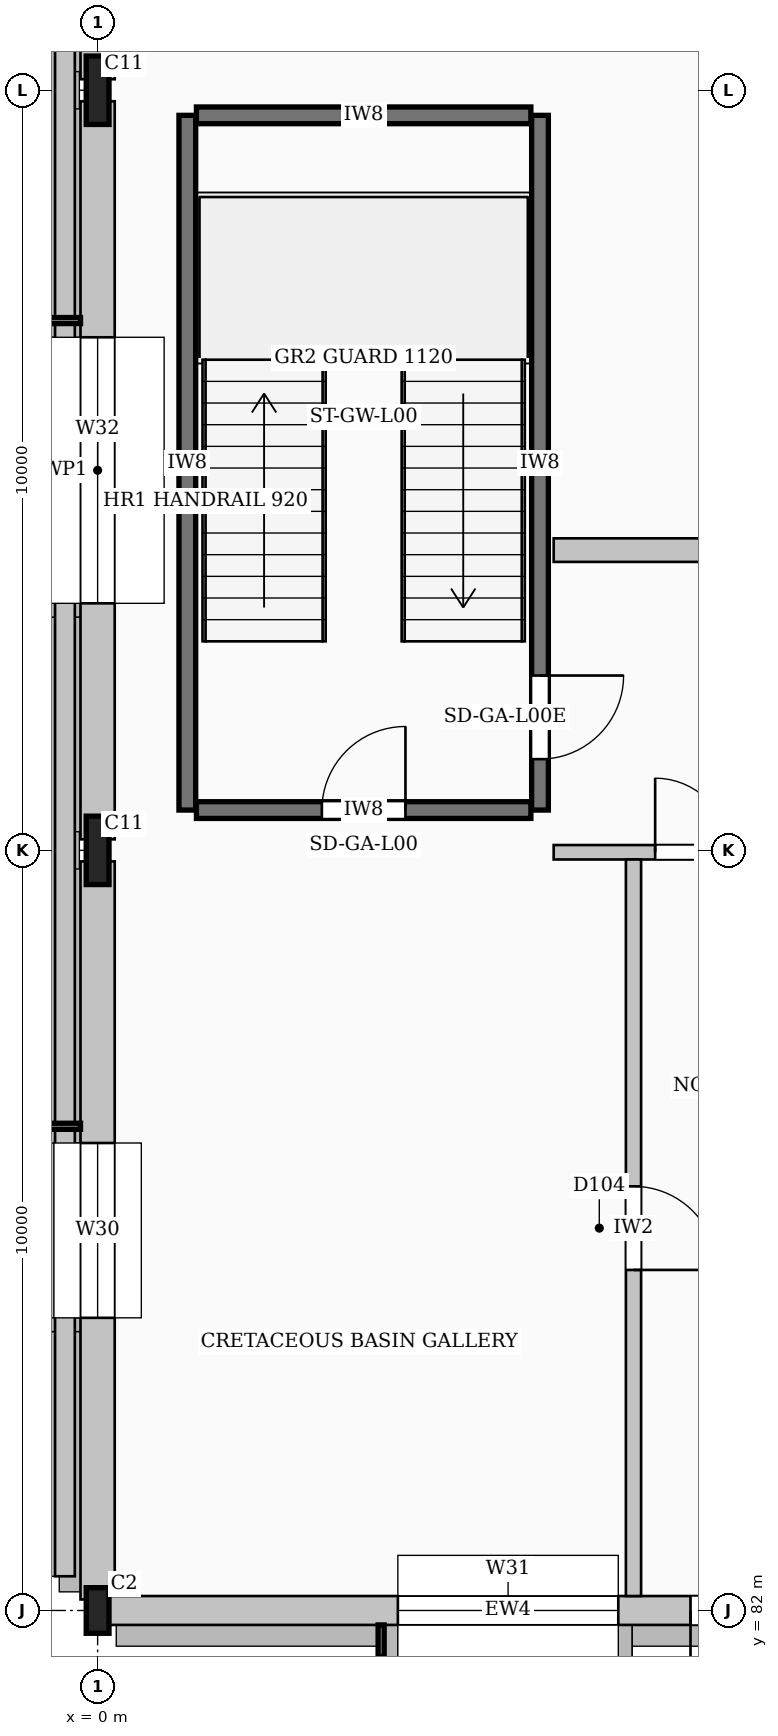
"""IFC4 building model, lengths in metres.
Left out: names, types, materials, properties, quantities, classifications, styles, units other than length and angle.
Written with IfcOpenShell. Run it as: python <this file> out.ifc"""

import sys

from ifc_helpers import new_model, si_unit, direction, frame, frame_2d, origin, origin_2d, place, context, subcontext, project, spatial, rectangle, i_section, extrude, element, fill, save


model = new_model("IFC4")
c1 = context("Model", 3, precision=1e-05, world=origin(), true_north=direction((0.0, 1.0)))
c2 = subcontext(c1, "Body", "Model", "MODEL_VIEW")
j1 = project(units=[si_unit("LENGTHUNIT", "METRE"), si_unit("PLANEANGLEUNIT", "RADIAN")], contexts=[c1])
p1 = place(None, origin())
s1 = spatial("IfcSite", under=j1, at=p1, CompositionType="ELEMENT")
p2 = place(p1, origin())
s2 = spatial("IfcBuilding", under=s1, at=p2, CompositionType="ELEMENT")
p3 = place(p2, origin())
s3 = spatial("IfcBuildingStorey", under=s2, at=p3, CompositionType="ELEMENT", Elevation=0.0)
p4 = place(p3, frame((0.0, 82.0, 0.0), z_axis=(0.0, 0.0, 1.0), x_axis=(1.0, 0.0, 0.0)))
e1 = element("IfcColumn", 1, at=p4, inside=s3, PredefinedType="COLUMN", context=c2, shape_type="SweptSolid", body=[
    extrude(i_section(OverallWidth=0.3, OverallDepth=0.6, WebThickness=0.015, FlangeThickness=0.03, FilletRadius=0.027, at=origin_2d()), origin(), (0.0, 0.0, 1.0), 4.8),
])
for number, where, z_axis, x_axis in (
    (2, (0.0, 92.0, 0.0), (0.0, 0.0, 1.0), (1.0, 0.0, 0.0)),
    (3, (0.0, 102.0, 0.0), (0.0, 0.0, 1.0), (1.0, 0.0, 0.0)),
):
    element("IfcColumn", number, at=place(p3, frame(where, z_axis=z_axis, x_axis=x_axis)), inside=s3, PredefinedType="COLUMN", context=c2, shape_type="SweptSolid", body=[
        extrude(i_section(OverallWidth=0.3, OverallDepth=0.9, WebThickness=0.019, FlangeThickness=0.035, FilletRadius=0.03, at=origin_2d()), origin(), (0.0, 0.0, 1.0), 4.8),
    ])
p5 = place(p3, frame((-0.43, 82.45, -1.38), z_axis=(0.0, 0.0, 1.0), x_axis=(0.0, 1.0, 0.0)))
e4 = element("IfcWall", 4, at=p5, inside=s3, PredefinedType="PARAPET", context=c2, shape_type="SweptSolid", body=[
    extrude(rectangle(XDim=29.1, YDim=0.26, at=frame_2d((14.55, 0.0))), origin(), (0.0, 0.0, 1.0), 5.92),
])
p6 = place(p3, frame((0.0, 111.855, 0.0), z_axis=(0.0, 0.0, 1.0), x_axis=(0.0, -1.0, 0.0)))
e5 = element("IfcWall", 5, at=p6, inside=s3, PredefinedType="STANDARD", context=c2, shape_type="SweptSolid", body=[
    extrude(rectangle(XDim=9.71, YDim=0.45, at=frame_2d((4.855, 0.0))), origin(), (0.0, 0.0, 1.0), 4.56),
])
p7 = place(p6, frame((4.08, 0.0, 1.0)))
e6 = element("IfcOpeningElement", 6, at=p7, cuts=e5, PredefinedType="OPENING", context=c2, shape_type="SweptSolid", body=[
    extrude(rectangle(XDim=1.55, YDim=2.5, at=frame_2d((0.775, 1.25))), frame((0.0, 0.235, 0.0), z_axis=(0.0, -1.0, 0.0), x_axis=(1.0, 0.0, 0.0)), (0.0, 0.0, 1.0), 0.47),
])
p8 = place(p3, frame((0.0, 101.855, 0.0), z_axis=(0.0, 0.0, 1.0), x_axis=(0.0, -1.0, 0.0)))
e7 = element("IfcWall", 7, at=p8, inside=s3, PredefinedType="STANDARD", context=c2, shape_type="SweptSolid", body=[
    extrude(rectangle(XDim=9.71, YDim=0.45, at=frame_2d((4.855, 0.0))), origin(), (0.0, 0.0, 1.0), 4.56),
])
p9 = place(p8, frame((3.105, 0.0, 1.0)))
e8 = element("IfcOpeningElement", 8, at=p9, cuts=e7, PredefinedType="OPENING", context=c2, shape_type="SweptSolid", body=[
    extrude(rectangle(XDim=3.5, YDim=2.3, at=frame_2d((1.75, 1.15))), frame((0.0, 0.235, 0.0), z_axis=(0.0, -1.0, 0.0), x_axis=(1.0, 0.0, 0.0)), (0.0, 0.0, 1.0), 0.47),
])
p10 = place(p3, frame((0.0, 91.855, 0.0), z_axis=(0.0, 0.0, 1.0), x_axis=(0.0, -1.0, 0.0)))
e9 = element("IfcWall", 9, at=p10, inside=s3, PredefinedType="STANDARD", context=c2, shape_type="SweptSolid", body=[
    extrude(rectangle(XDim=9.71, YDim=0.45, at=frame_2d((4.855, 0.0))), origin(), (0.0, 0.0, 1.0), 4.56),
])
p11 = place(p10, frame((3.705, 0.0, 1.0)))
e10 = element("IfcOpeningElement", 10, at=p11, cuts=e9, PredefinedType="OPENING", context=c2, shape_type="SweptSolid", body=[
    extrude(rectangle(XDim=2.3, YDim=2.3, at=frame_2d((1.15, 1.15))), frame((0.0, 0.235, 0.0), z_axis=(0.0, -1.0, 0.0), x_axis=(1.0, 0.0, 0.0)), (0.0, 0.0, 1.0), 0.47),
])
p12 = place(p3, frame((0.145, 82.0, 0.0), z_axis=(0.0, 0.0, 1.0), x_axis=(1.0, 0.0, 0.0)))
e11 = element("IfcWall", 11, at=p12, inside=s3, PredefinedType="STANDARD", context=c2, shape_type="SweptSolid", body=[
    extrude(rectangle(XDim=10.51, YDim=0.38, at=frame_2d((5.255, 0.0))), origin(), (0.0, 0.0, 1.0), 4.009),
])
p13 = place(p12, frame((3.805, 0.0, 1.0)))
e12 = element("IfcOpeningElement", 12, at=p13, cuts=e11, PredefinedType="OPENING", context=c2, shape_type="SweptSolid", body=[
    extrude(rectangle(XDim=2.9, YDim=2.5, at=frame_2d((1.45, 1.25))), frame((0.0, 0.2, 0.0), z_axis=(0.0, -1.0, 0.0), x_axis=(1.0, 0.0, 0.0)), (0.0, 0.0, 1.0), 0.4),
])
p14 = place(p12, frame((7.655, 0.0, 0.0)))
e13 = element("IfcOpeningElement", 13, at=p14, cuts=e11, PredefinedType="OPENING", context=c2, shape_type="SweptSolid", body=[
    extrude(rectangle(XDim=2.0, YDim=2.3, at=frame_2d((1.0, 1.15))), frame((0.0, 0.2, 0.0), z_axis=(0.0, -1.0, 0.0), x_axis=(1.0, 0.0, 0.0)), (0.0, 0.0, 1.0), 0.4),
])
p15 = place(p3, frame((1.18, 92.53, 0.0), z_axis=(0.0, 0.0, 1.0), x_axis=(0.0, 1.0, 0.0)))
e14 = element("IfcWall", 14, at=p15, inside=s3, PredefinedType="SHEAR", context=c2, shape_type="SweptSolid", body=[
    extrude(rectangle(XDim=9.14, YDim=0.22, at=frame_2d((4.57, 0.0))), origin(), (0.0, 0.0, 1.0), 4.56),
])
p16 = place(p3, frame((5.82, 92.53, 0.0), z_axis=(0.0, 0.0, 1.0), x_axis=(0.0, 1.0, 0.0)))
e15 = element("IfcWall", 15, at=p16, inside=s3, PredefinedType="SHEAR", context=c2, shape_type="SweptSolid", body=[
    extrude(rectangle(XDim=9.14, YDim=0.22, at=frame_2d((4.57, 0.0))), origin(), (0.0, 0.0, 1.0), 4.56),
])
p17 = place(p16, frame((0.67, 0.0, 0.0)))
e16 = element("IfcOpeningElement", 16, at=p17, cuts=e15, PredefinedType="OPENING", context=c2, shape_type="SweptSolid", body=[
    extrude(rectangle(XDim=1.1, YDim=2.2, at=frame_2d((0.55, 1.1))), frame((0.0, 0.12, 0.0), z_axis=(0.0, -1.0, 0.0), x_axis=(1.0, 0.0, 0.0)), (0.0, 0.0, 1.0), 0.24),
])
p18 = place(p3, frame((1.3, 101.67, 0.0), z_axis=(0.0, 0.0, 1.0), x_axis=(1.0, 0.0, 0.0)))
e17 = element("IfcWall", 17, at=p18, inside=s3, PredefinedType="SHEAR", context=c2, shape_type="SweptSolid", body=[
    extrude(rectangle(XDim=4.4, YDim=0.22, at=frame_2d((2.2, 0.0))), origin(), (0.0, 0.0, 1.0), 4.56),
])
p19 = place(p3, frame((1.3, 92.53, 0.0), z_axis=(0.0, 0.0, 1.0), x_axis=(1.0, 0.0, 0.0)))
e18 = element("IfcWall", 18, at=p19, inside=s3, PredefinedType="SHEAR", context=c2, shape_type="SweptSolid", body=[
    extrude(rectangle(XDim=4.4, YDim=0.22, at=frame_2d((2.2, 0.0))), origin(), (0.0, 0.0, 1.0), 4.56),
])
p20 = place(p19, frame((1.65, 0.0, 0.0)))
e19 = element("IfcOpeningElement", 19, at=p20, cuts=e18, PredefinedType="OPENING", context=c2, shape_type="SweptSolid", body=[
    extrude(rectangle(XDim=1.1, YDim=2.2, at=frame_2d((0.55, 1.1))), frame((0.0, 0.12, 0.0), z_axis=(0.0, -1.0, 0.0), x_axis=(1.0, 0.0, 0.0)), (0.0, 0.0, 1.0), 0.24),
])
p21 = place(p3, frame((6.0, 91.975, 0.0), z_axis=(0.0, 0.0, 1.0), x_axis=(1.0, 0.0, 0.0)))
e20 = element("IfcWall", 20, at=p21, inside=s3, PredefinedType="PARTITIONING", context=c2, shape_type="SweptSolid", body=[
    extrude(rectangle(XDim=4.62, YDim=0.19, at=frame_2d((2.31, 0.0))), origin(), (0.0, 0.0, 1.0), 4.069),
])
p22 = place(p21, frame((1.335, 0.0, 0.0)))
e21 = element("IfcOpeningElement", 21, at=p22, cuts=e20, PredefinedType="OPENING", context=c2, shape_type="SweptSolid", body=[
    extrude(rectangle(XDim=1.95, YDim=2.5, at=frame_2d((0.975, 1.25))), frame((0.0, 0.105, 0.0), z_axis=(0.0, -1.0, 0.0), x_axis=(1.0, 0.0, 0.0)), (0.0, 0.0, 1.0), 0.21),
])
p23 = place(p3, frame((6.0, 95.95, 0.0), z_axis=(0.0, 0.0, 1.0), x_axis=(1.0, 0.0, 0.0)))
e22 = element("IfcWall", 22, at=p23, inside=s3, PredefinedType="PARTITIONING", context=c2, shape_type="SweptSolid", body=[
    extrude(rectangle(XDim=15.42, YDim=0.31, at=frame_2d((7.71, 0.0))), origin(), (0.0, 0.0, 1.0), 4.52),
])
p24 = place(p23, frame((6.56, 0.0, 0.0)))
e23 = element("IfcOpeningElement", 23, at=p24, cuts=e22, PredefinedType="OPENING", context=c2, shape_type="SweptSolid", body=[
    extrude(rectangle(XDim=2.3, YDim=2.65, at=frame_2d((1.15, 1.325))), frame((0.0, 0.165, 0.0), z_axis=(0.0, -1.0, 0.0), x_axis=(1.0, 0.0, 0.0)), (0.0, 0.0, 1.0), 0.33),
])
p25 = place(p3, frame((7.05, 82.19, 0.0), z_axis=(0.0, 0.0, 1.0), x_axis=(0.0, 1.0, 0.0)))
e24 = element("IfcWall", 24, at=p25, inside=s3, PredefinedType="SOLIDWALL", context=c2, shape_type="SweptSolid", body=[
    extrude(rectangle(XDim=9.69, YDim=0.2, at=frame_2d((4.845, 0.0))), origin(), (0.0, 0.0, 1.0), 4.069),
])
p26 = place(p25, frame((4.29, 0.0, 0.0)))
e25 = element("IfcOpeningElement", 25, at=p26, cuts=e24, PredefinedType="OPENING", context=c2, shape_type="SweptSolid", body=[
    extrude(rectangle(XDim=1.1, YDim=2.2, at=frame_2d((0.55, 1.1))), frame((0.0, 0.11, 0.0), z_axis=(0.0, -1.0, 0.0), x_axis=(1.0, 0.0, 0.0)), (0.0, 0.0, 1.0), 0.22),
])
p27 = place(p9, origin())
e26 = element("IfcWindow", 26, at=p27, inside=s3, PartitioningType="SINGLE_PANEL", PredefinedType="WINDOW", context=c2, shape_type="SweptSolid", body=[
    extrude(rectangle(XDim=3.5, YDim=2.3, at=frame_2d((1.75, 1.15))), frame((0.0, 0.03, 0.0), z_axis=(0.0, -1.0, 0.0), x_axis=(1.0, 0.0, 0.0)), (0.0, 0.0, 1.0), 0.06),
])
fill(e8, e26)
p28 = place(p11, origin())
e27 = element("IfcWindow", 27, at=p28, inside=s3, PartitioningType="SINGLE_PANEL", PredefinedType="WINDOW", context=c2, shape_type="SweptSolid", body=[
    extrude(rectangle(XDim=2.3, YDim=2.3, at=frame_2d((1.15, 1.15))), frame((0.0, 0.03, 0.0), z_axis=(0.0, -1.0, 0.0), x_axis=(1.0, 0.0, 0.0)), (0.0, 0.0, 1.0), 0.06),
])
fill(e10, e27)
p29 = place(p13, origin())
e28 = element("IfcWindow", 28, at=p29, inside=s3, PartitioningType="SINGLE_PANEL", PredefinedType="WINDOW", context=c2, shape_type="SweptSolid", body=[
    extrude(rectangle(XDim=2.9, YDim=2.5, at=frame_2d((1.45, 1.25))), frame((0.0, 0.03, 0.0), z_axis=(0.0, -1.0, 0.0), x_axis=(1.0, 0.0, 0.0)), (0.0, 0.0, 1.0), 0.06),
])
fill(e12, e28)
p30 = place(p20, origin())
e29 = element("IfcDoor", 29, at=p30, inside=s3, OperationType="SINGLE_SWING_RIGHT", PredefinedType="DOOR", context=c2, shape_type="SweptSolid", body=[
    extrude(rectangle(XDim=1.1, YDim=2.2, at=frame_2d((0.55, 1.1))), frame((0.0, 0.025, 0.0), z_axis=(0.0, -1.0, 0.0), x_axis=(1.0, 0.0, 0.0)), (0.0, 0.0, 1.0), 0.05),
])
fill(e19, e29)
p31 = place(p22, origin())
e30 = element("IfcDoor", 30, at=p31, inside=s3, OperationType="DOUBLE_DOOR_SINGLE_SWING", PredefinedType="DOOR", context=c2, shape_type="SweptSolid", body=[
    extrude(rectangle(XDim=1.95, YDim=2.5, at=frame_2d((0.975, 1.25))), frame((0.0, 0.025, 0.0), z_axis=(0.0, -1.0, 0.0), x_axis=(1.0, 0.0, 0.0)), (0.0, 0.0, 1.0), 0.05),
])
fill(e21, e30)
p32 = place(p26, frame((1.1, 0.0, 0.0), z_axis=(0.0, 0.0, 1.0), x_axis=(-1.0, 0.0, 0.0)))
e31 = element("IfcDoor", 31, at=p32, inside=s3, OperationType="SINGLE_SWING_LEFT", PredefinedType="DOOR", context=c2, shape_type="SweptSolid", body=[
    extrude(rectangle(XDim=1.1, YDim=2.2, at=frame_2d((0.55, 1.1))), frame((0.0, 0.025, 0.0), z_axis=(0.0, -1.0, 0.0), x_axis=(1.0, 0.0, 0.0)), (0.0, 0.0, 1.0), 0.05),
])
fill(e25, e31)
p33 = place(p14, frame((2.0, 0.0, 0.0), z_axis=(0.0, 0.0, 1.0), x_axis=(-1.0, 0.0, 0.0)))
e32 = element("IfcDoor", 32, at=p33, inside=s3, OperationType="DOUBLE_DOOR_SINGLE_SWING", PredefinedType="DOOR", context=c2, shape_type="SweptSolid", body=[
    extrude(rectangle(XDim=2.0, YDim=2.3, at=frame_2d((1.0, 1.15))), frame((0.0, 0.025, 0.0), z_axis=(0.0, -1.0, 0.0), x_axis=(1.0, 0.0, 0.0)), (0.0, 0.0, 1.0), 0.05),
])
fill(e13, e32)
p34 = place(p17, frame((1.1, 0.0, 0.0), z_axis=(0.0, 0.0, 1.0), x_axis=(-1.0, 0.0, 0.0)))
e33 = element("IfcDoor", 33, at=p34, inside=s3, OperationType="SINGLE_SWING_RIGHT", PredefinedType="DOOR", context=c2, shape_type="SweptSolid", body=[
    extrude(rectangle(XDim=1.1, YDim=2.2, at=frame_2d((0.55, 1.1))), frame((0.0, 0.025, 0.0), z_axis=(0.0, -1.0, 0.0), x_axis=(1.0, 0.0, 0.0)), (0.0, 0.0, 1.0), 0.05),
])
fill(e16, e33)
save(model, sys.argv[1])
